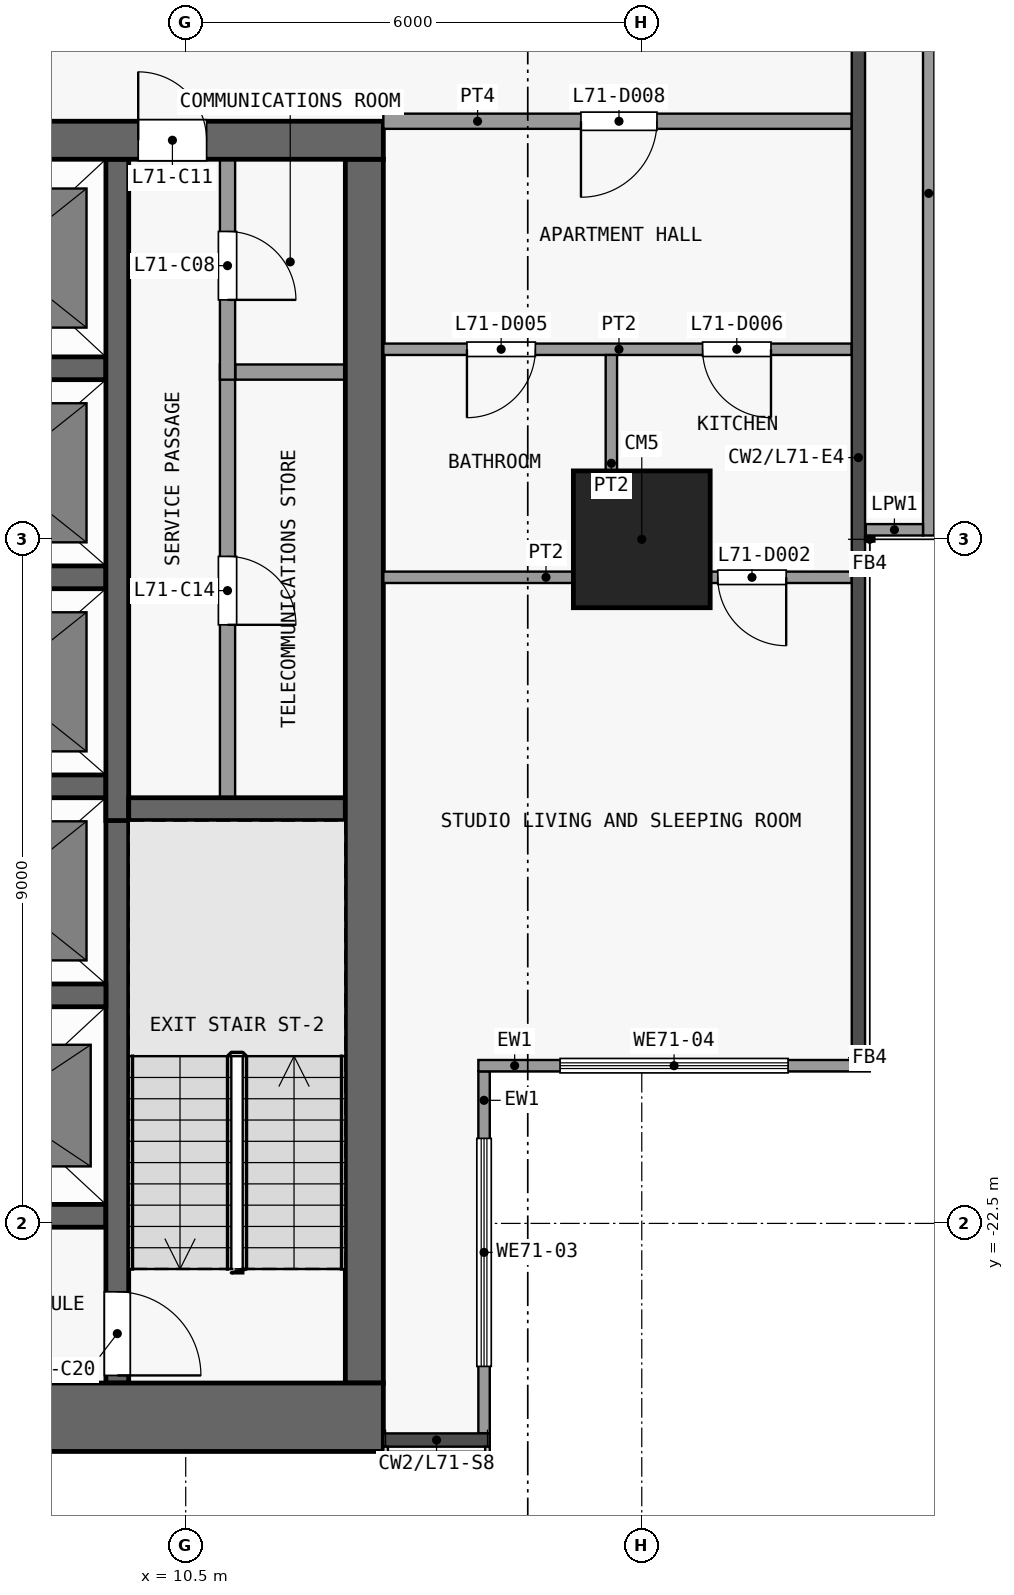
"""IFC4 building model, lengths in metres.
Left out: names, types, materials, properties, quantities, classifications, styles, units other than length and angle.
Written with IfcOpenShell. Run it as: python <this file> out.ifc"""

import sys

from ifc_helpers import new_model, si_unit, direction, frame, frame_2d, origin, origin_2d, place, context, subcontext, project, spatial, rectangle, extrude, element, fill, save


model = new_model("IFC4")
c1 = context("Model", 3, precision=1e-05, world=origin(), true_north=direction((0.0, 1.0)))
c2 = subcontext(c1, "Body", "Model", "MODEL_VIEW")
j1 = project(units=[si_unit("LENGTHUNIT", "METRE"), si_unit("PLANEANGLEUNIT", "RADIAN")], contexts=[c1])
p1 = place(None, origin())
s1 = spatial("IfcSite", under=j1, at=p1, CompositionType="ELEMENT")
p2 = place(p1, origin())
s2 = spatial("IfcBuilding", under=s1, at=p2, CompositionType="ELEMENT")
p3 = place(p2, frame((0.0, 0.0, 280.7)))
s3 = spatial("IfcBuildingStorey", under=s2, at=p3, CompositionType="ELEMENT", Elevation=280.7)
p4 = place(p3, frame((16.5, -13.5, 0.0), z_axis=(0.0, 0.0, 1.0), x_axis=(1.0, 0.0, 0.0)))
e1 = element("IfcColumn", 1, at=p4, inside=s3, PredefinedType="COLUMN", context=c2, shape_type="SweptSolid", body=[
    extrude(rectangle(XDim=1.8, YDim=1.8, at=origin_2d()), origin(), (0.0, 0.0, 1.0), 3.6),
])
p5 = place(p3, frame((-13.1, -25.05, 0.0), z_axis=(0.0, 0.0, 1.0), x_axis=(1.0, 0.0, 0.0)))
e2 = element("IfcWall", 2, at=p5, inside=s3, PredefinedType="SHEAR", context=c2, shape_type="SweptSolid", body=[
    extrude(rectangle(XDim=26.2, YDim=0.9, at=frame_2d((13.1, 0.0))), origin(), (0.0, 0.0, 1.0), 3.3),
])
p6 = place(p3, frame((-13.1, -8.25, 0.0), z_axis=(0.0, 0.0, 1.0), x_axis=(1.0, 0.0, 0.0)))
e3 = element("IfcWall", 3, at=p6, inside=s3, PredefinedType="SHEAR", context=c2, shape_type="SweptSolid", body=[
    extrude(rectangle(XDim=26.2, YDim=0.5, at=frame_2d((13.1, 0.0))), origin(), (0.0, 0.0, 1.0), 3.3),
])
p7 = place(p6, frame((7.4, 0.0, 0.0)))
e4 = element("IfcOpeningElement", 4, at=p7, cuts=e3, PredefinedType="OPENING", context=c2, shape_type="SweptSolid", body=[
    extrude(rectangle(XDim=1.8, YDim=2.1, at=frame_2d((0.9, 1.05))), frame((0.0, 0.26, 0.0), z_axis=(0.0, -1.0, 0.0), x_axis=(1.0, 0.0, 0.0)), (0.0, 0.0, 1.0), 0.52),
])
p8 = place(p6, frame((17.0, 0.0, 0.0)))
e5 = element("IfcOpeningElement", 5, at=p8, cuts=e3, PredefinedType="OPENING", context=c2, shape_type="SweptSolid", body=[
    extrude(rectangle(XDim=1.8, YDim=2.1, at=frame_2d((0.9, 1.05))), frame((0.0, 0.26, 0.0), z_axis=(0.0, -1.0, 0.0), x_axis=(1.0, 0.0, 0.0)), (0.0, 0.0, 1.0), 0.52),
])
p9 = place(p6, frame((2.325, 0.0, 0.0)))
e6 = element("IfcOpeningElement", 6, at=p9, cuts=e3, PredefinedType="OPENING", context=c2, shape_type="SweptSolid", body=[
    extrude(rectangle(XDim=0.9, YDim=2.1, at=frame_2d((0.45, 1.05))), frame((0.0, 0.26, 0.0), z_axis=(0.0, -1.0, 0.0), x_axis=(1.0, 0.0, 0.0)), (0.0, 0.0, 1.0), 0.52),
])
p10 = place(p6, frame((22.975, 0.0, 0.0)))
e7 = element("IfcOpeningElement", 7, at=p10, cuts=e3, PredefinedType="OPENING", context=c2, shape_type="SweptSolid", body=[
    extrude(rectangle(XDim=0.9, YDim=2.1, at=frame_2d((0.45, 1.05))), frame((0.0, 0.26, 0.0), z_axis=(0.0, -1.0, 0.0), x_axis=(1.0, 0.0, 0.0)), (0.0, 0.0, 1.0), 0.52),
])
p11 = place(p3, frame((12.85, -24.6, 0.0), z_axis=(0.0, 0.0, 1.0), x_axis=(0.0, 1.0, 0.0)))
e8 = element("IfcWall", 8, at=p11, inside=s3, PredefinedType="SHEAR", context=c2, shape_type="SweptSolid", body=[
    extrude(rectangle(XDim=16.1, YDim=0.5, at=frame_2d((8.05, 0.0))), origin(), (0.0, 0.0, 1.0), 3.3),
])
for number, where, z_axis, x_axis in (
    (9, (6.65, -22.4, 0.0), (0.0, 0.0, 1.0), (1.0, 0.0, 0.0)),
    (10, (6.65, -19.5, 0.0), (0.0, 0.0, 1.0), (1.0, 0.0, 0.0)),
):
    element("IfcWall", number, at=place(p3, frame(where, z_axis=z_axis, x_axis=x_axis)), inside=s3, PredefinedType="SHEAR", context=c2, shape_type="SweptSolid", body=[
        extrude(rectangle(XDim=2.8, YDim=0.3, at=frame_2d((1.4, 0.0))), origin(), (0.0, 0.0, 1.0), 3.3),
    ])
p12 = place(p3, frame((9.75, -17.05, 0.0), z_axis=(0.0, 0.0, 1.0), x_axis=(1.0, 0.0, 0.0)))
e11 = element("IfcWall", 11, at=p12, inside=s3, PredefinedType="SHEAR", context=c2, shape_type="SweptSolid", body=[
    extrude(rectangle(XDim=2.85, YDim=0.3, at=frame_2d((1.425, 0.0))), origin(), (0.0, 0.0, 1.0), 3.3),
])
for number, where, z_axis, x_axis in (
    (12, (6.65, -16.75, 0.0), (0.0, 0.0, 1.0), (1.0, 0.0, 0.0)),
    (13, (6.65, -14.0, 0.0), (0.0, 0.0, 1.0), (1.0, 0.0, 0.0)),
):
    element("IfcWall", number, at=place(p3, frame(where, z_axis=z_axis, x_axis=x_axis)), inside=s3, PredefinedType="SHEAR", context=c2, shape_type="SweptSolid", body=[
        extrude(rectangle(XDim=2.8, YDim=0.3, at=frame_2d((1.4, 0.0))), origin(), (0.0, 0.0, 1.0), 3.3),
    ])
p13 = place(p3, frame((11.15, -11.3, 0.0), z_axis=(0.0, 0.0, 1.0), x_axis=(1.0, 0.0, 0.0)))
e14 = element("IfcWall", 14, at=p13, inside=s3, PredefinedType="PARTITIONING", context=c2, shape_type="SweptSolid", body=[
    extrude(rectangle(XDim=1.45, YDim=0.2, at=frame_2d((0.725, 0.0))), origin(), (0.0, 0.0, 1.0), 3.3),
])
p14 = place(p3, frame((6.65, -11.25, 0.0), z_axis=(0.0, 0.0, 1.0), x_axis=(1.0, 0.0, 0.0)))
e15 = element("IfcWall", 15, at=p14, inside=s3, PredefinedType="SHEAR", context=c2, shape_type="SweptSolid", body=[
    extrude(rectangle(XDim=2.8, YDim=0.3, at=frame_2d((1.4, 0.0))), origin(), (0.0, 0.0, 1.0), 3.3),
])
p15 = place(p3, frame((9.6, -16.9, 0.0), z_axis=(0.0, 0.0, 1.0), x_axis=(0.0, -1.0, 0.0)))
e16 = element("IfcWall", 16, at=p15, inside=s3, PredefinedType="SHEAR", context=c2, shape_type="SweptSolid", body=[
    extrude(rectangle(XDim=7.7, YDim=0.3, at=frame_2d((3.85, 0.0))), origin(), (0.0, 0.0, 1.0), 3.3),
])
p16 = place(p15, frame((6.5, 0.0, 0.0)))
e17 = element("IfcOpeningElement", 17, at=p16, cuts=e16, PredefinedType="OPENING", context=c2, shape_type="SweptSolid", body=[
    extrude(rectangle(XDim=1.1, YDim=2.1, at=frame_2d((0.55, 1.05))), frame((0.0, 0.16, 0.0), z_axis=(0.0, -1.0, 0.0), x_axis=(1.0, 0.0, 0.0)), (0.0, 0.0, 1.0), 0.32),
])
p17 = place(p3, frame((9.6, -17.2, 0.0), z_axis=(0.0, 0.0, 1.0), x_axis=(0.0, 1.0, 0.0)))
e18 = element("IfcWall", 18, at=p17, inside=s3, PredefinedType="SHEAR", context=c2, shape_type="SweptSolid", body=[
    extrude(rectangle(XDim=8.7, YDim=0.3, at=frame_2d((4.35, 0.0))), origin(), (0.0, 0.0, 1.0), 3.3),
])
p18 = place(p3, frame((11.05, -11.2, 0.0), z_axis=(0.0, 0.0, 1.0), x_axis=(0.0, -1.0, 0.0)))
e19 = element("IfcWall", 19, at=p18, inside=s3, PredefinedType="PARTITIONING", context=c2, shape_type="SweptSolid", body=[
    extrude(rectangle(XDim=5.7, YDim=0.2, at=frame_2d((2.85, 0.0))), origin(), (0.0, 0.0, 1.0), 3.3),
])
p19 = place(p18, frame((2.525, 0.0, 0.0)))
e20 = element("IfcOpeningElement", 20, at=p19, cuts=e19, PredefinedType="OPENING", context=c2, shape_type="SweptSolid", body=[
    extrude(rectangle(XDim=0.9, YDim=2.1, at=frame_2d((0.45, 1.05))), frame((0.0, 0.11, 0.0), z_axis=(0.0, -1.0, 0.0), x_axis=(1.0, 0.0, 0.0)), (0.0, 0.0, 1.0), 0.22),
])
p20 = place(p3, frame((11.05, -8.5, 0.0), z_axis=(0.0, 0.0, 1.0), x_axis=(0.0, -1.0, 0.0)))
e21 = element("IfcWall", 21, at=p20, inside=s3, PredefinedType="PARTITIONING", context=c2, shape_type="SweptSolid", body=[
    extrude(rectangle(XDim=2.9, YDim=0.2, at=frame_2d((1.45, 0.0))), origin(), (0.0, 0.0, 1.0), 3.3),
])
p21 = place(p20, frame((0.95, 0.0, 0.0)))
e22 = element("IfcOpeningElement", 22, at=p21, cuts=e21, PredefinedType="OPENING", context=c2, shape_type="SweptSolid", body=[
    extrude(rectangle(XDim=0.9, YDim=2.1, at=frame_2d((0.45, 1.05))), frame((0.0, 0.11, 0.0), z_axis=(0.0, -1.0, 0.0), x_axis=(1.0, 0.0, 0.0)), (0.0, 0.0, 1.0), 0.22),
])
p22 = place(p3, frame((14.425, -20.5, 0.0), z_axis=(0.0, 0.0, 1.0), x_axis=(0.0, -1.0, 0.0)))
e23 = element("IfcWall", 23, at=p22, inside=s3, PredefinedType="SOLIDWALL", context=c2, shape_type="SweptSolid", body=[
    extrude(rectangle(XDim=4.762, YDim=0.15, at=frame_2d((2.381, 0.0))), origin(), (0.0, 0.0, 1.0), 3.3),
])
p23 = place(p22, frame((0.881, 0.0, 0.9)))
e24 = element("IfcOpeningElement", 24, at=p23, cuts=e23, PredefinedType="OPENING", context=c2, shape_type="SweptSolid", body=[
    extrude(rectangle(XDim=3.0, YDim=2.4, at=frame_2d((1.5, 1.2))), frame((0.0, 0.085, 0.0), z_axis=(0.0, -1.0, 0.0), x_axis=(1.0, 0.0, 0.0)), (0.0, 0.0, 1.0), 0.17),
])
p24 = place(p3, frame((19.5, -20.425, 0.0), z_axis=(0.0, 0.0, 1.0), x_axis=(-1.0, 0.0, 0.0)))
e25 = element("IfcWall", 25, at=p24, inside=s3, PredefinedType="SOLIDWALL", context=c2, shape_type="SweptSolid", body=[
    extrude(rectangle(XDim=5.15, YDim=0.15, at=frame_2d((2.575, 0.0))), origin(), (0.0, 0.0, 1.0), 3.3),
])
p25 = place(p24, frame((1.075, 0.0, 0.9)))
e26 = element("IfcOpeningElement", 26, at=p25, cuts=e25, PredefinedType="OPENING", context=c2, shape_type="SweptSolid", body=[
    extrude(rectangle(XDim=3.0, YDim=2.4, at=frame_2d((1.5, 1.2))), frame((0.0, 0.085, 0.0), z_axis=(0.0, -1.0, 0.0), x_axis=(1.0, 0.0, 0.0)), (0.0, 0.0, 1.0), 0.17),
])
p26 = place(p3, frame((20.275, -4.448, 0.0), z_axis=(0.0, 0.0, 1.0), x_axis=(0.0, -1.0, 0.0)))
e27 = element("IfcWall", 27, at=p26, inside=s3, PredefinedType="PARAPET", context=c2, shape_type="SweptSolid", body=[
    extrude(rectangle(XDim=9.002, YDim=0.15, at=frame_2d((4.501, 0.0))), origin(), (0.0, 0.0, 1.0), 1.15),
])
p27 = place(p3, frame((20.2, -13.375, 0.0), z_axis=(0.0, 0.0, 1.0), x_axis=(-1.0, 0.0, 0.0)))
e28 = element("IfcWall", 28, at=p27, inside=s3, PredefinedType="PARAPET", context=c2, shape_type="SweptSolid", body=[
    extrude(rectangle(XDim=0.752, YDim=0.15, at=frame_2d((0.376, 0.0))), origin(), (0.0, 0.0, 1.0), 1.15),
])
p28 = place(p3, frame((13.1, -14.0, 0.0), z_axis=(0.0, 0.0, 1.0), x_axis=(1.0, 0.0, 0.0)))
e29 = element("IfcWall", 29, at=p28, inside=s3, PredefinedType="PARTITIONING", context=c2, shape_type="SweptSolid", body=[
    extrude(rectangle(XDim=6.162, YDim=0.15, at=frame_2d((3.081, 0.0))), origin(), (0.0, 0.0, 1.0), 3.3),
])
p29 = place(p28, frame((4.4, 0.0, 0.0)))
e30 = element("IfcOpeningElement", 30, at=p29, cuts=e29, PredefinedType="OPENING", context=c2, shape_type="SweptSolid", body=[
    extrude(rectangle(XDim=0.9, YDim=2.1, at=frame_2d((0.45, 1.05))), frame((0.0, 0.085, 0.0), z_axis=(0.0, -1.0, 0.0), x_axis=(1.0, 0.0, 0.0)), (0.0, 0.0, 1.0), 0.17),
])
p30 = place(p3, frame((13.1, -11.0, 0.0), z_axis=(0.0, 0.0, 1.0), x_axis=(1.0, 0.0, 0.0)))
e31 = element("IfcWall", 31, at=p30, inside=s3, PredefinedType="PARTITIONING", context=c2, shape_type="SweptSolid", body=[
    extrude(rectangle(XDim=6.162, YDim=0.15, at=frame_2d((3.081, 0.0))), origin(), (0.0, 0.0, 1.0), 3.3),
])
p31 = place(p30, frame((1.1, 0.0, 0.0)))
e32 = element("IfcOpeningElement", 32, at=p31, cuts=e31, PredefinedType="OPENING", context=c2, shape_type="SweptSolid", body=[
    extrude(rectangle(XDim=0.9, YDim=2.1, at=frame_2d((0.45, 1.05))), frame((0.0, 0.085, 0.0), z_axis=(0.0, -1.0, 0.0), x_axis=(1.0, 0.0, 0.0)), (0.0, 0.0, 1.0), 0.17),
])
p32 = place(p30, frame((4.2, 0.0, 0.0)))
e33 = element("IfcOpeningElement", 33, at=p32, cuts=e31, PredefinedType="OPENING", context=c2, shape_type="SweptSolid", body=[
    extrude(rectangle(XDim=0.9, YDim=2.1, at=frame_2d((0.45, 1.05))), frame((0.0, 0.085, 0.0), z_axis=(0.0, -1.0, 0.0), x_axis=(1.0, 0.0, 0.0)), (0.0, 0.0, 1.0), 0.17),
])
p33 = place(p3, frame((13.1, -8.0, 0.0), z_axis=(0.0, 0.0, 1.0), x_axis=(1.0, 0.0, 0.0)))
e34 = element("IfcWall", 34, at=p33, inside=s3, PredefinedType="PARTITIONING", context=c2, shape_type="SweptSolid", body=[
    extrude(rectangle(XDim=6.162, YDim=0.2, at=frame_2d((3.081, 0.0))), origin(), (0.0, 0.0, 1.0), 3.3),
])
p34 = place(p33, frame((2.6, 0.0, 0.0)))
e35 = element("IfcOpeningElement", 35, at=p34, cuts=e34, PredefinedType="OPENING", context=c2, shape_type="SweptSolid", body=[
    extrude(rectangle(XDim=1.0, YDim=2.1, at=frame_2d((0.5, 1.05))), frame((0.0, 0.11, 0.0), z_axis=(0.0, -1.0, 0.0), x_axis=(1.0, 0.0, 0.0)), (0.0, 0.0, 1.0), 0.22),
])
p35 = place(p3, frame((16.1, -13.925, 0.0), z_axis=(0.0, 0.0, 1.0), x_axis=(0.0, 1.0, 0.0)))
e36 = element("IfcWall", 36, at=p35, inside=s3, PredefinedType="PARTITIONING", context=c2, shape_type="SweptSolid", body=[
    extrude(rectangle(XDim=2.85, YDim=0.15, at=frame_2d((1.425, 0.0))), origin(), (0.0, 0.0, 1.0), 3.3),
])
p36 = place(p21, origin())
e37 = element("IfcDoor", 37, at=p36, inside=s3, OperationType="SINGLE_SWING_RIGHT", PredefinedType="DOOR", context=c2, shape_type="SweptSolid", body=[
    extrude(rectangle(XDim=0.9, YDim=2.1, at=frame_2d((0.45, 1.05))), frame((0.0, 0.025, 0.0), z_axis=(0.0, -1.0, 0.0), x_axis=(1.0, 0.0, 0.0)), (0.0, 0.0, 1.0), 0.05),
])
fill(e22, e37)
p37 = place(p10, origin())
e38 = element("IfcDoor", 38, at=p37, inside=s3, OperationType="SINGLE_SWING_LEFT", PredefinedType="DOOR", context=c2, shape_type="SweptSolid", body=[
    extrude(rectangle(XDim=0.9, YDim=2.1, at=frame_2d((0.45, 1.05))), frame((0.0, 0.025, 0.0), z_axis=(0.0, -1.0, 0.0), x_axis=(1.0, 0.0, 0.0)), (0.0, 0.0, 1.0), 0.05),
])
fill(e7, e38)
p38 = place(p19, origin())
e39 = element("IfcDoor", 39, at=p38, inside=s3, OperationType="SINGLE_SWING_RIGHT", PredefinedType="DOOR", context=c2, shape_type="SweptSolid", body=[
    extrude(rectangle(XDim=0.9, YDim=2.1, at=frame_2d((0.45, 1.05))), frame((0.0, 0.025, 0.0), z_axis=(0.0, -1.0, 0.0), x_axis=(1.0, 0.0, 0.0)), (0.0, 0.0, 1.0), 0.05),
])
fill(e20, e39)
p39 = place(p16, origin())
e40 = element("IfcDoor", 40, at=p39, inside=s3, OperationType="SINGLE_SWING_RIGHT", PredefinedType="DOOR", context=c2, shape_type="SweptSolid", body=[
    extrude(rectangle(XDim=1.1, YDim=2.1, at=frame_2d((0.55, 1.05))), frame((0.0, 0.025, 0.0), z_axis=(0.0, -1.0, 0.0), x_axis=(1.0, 0.0, 0.0)), (0.0, 0.0, 1.0), 0.05),
])
fill(e17, e40)
p40 = place(p23, origin())
e41 = element("IfcWindow", 41, at=p40, inside=s3, PartitioningType="SINGLE_PANEL", PredefinedType="WINDOW", context=c2, shape_type="SweptSolid", body=[
    extrude(rectangle(XDim=3.0, YDim=2.4, at=frame_2d((1.5, 1.2))), frame((0.0, 0.03, 0.0), z_axis=(0.0, -1.0, 0.0), x_axis=(1.0, 0.0, 0.0)), (0.0, 0.0, 1.0), 0.06),
])
fill(e24, e41)
p41 = place(p25, origin())
e42 = element("IfcWindow", 42, at=p41, inside=s3, PartitioningType="SINGLE_PANEL", PredefinedType="WINDOW", context=c2, shape_type="SweptSolid", body=[
    extrude(rectangle(XDim=3.0, YDim=2.4, at=frame_2d((1.5, 1.2))), frame((0.0, 0.03, 0.0), z_axis=(0.0, -1.0, 0.0), x_axis=(1.0, 0.0, 0.0)), (0.0, 0.0, 1.0), 0.06),
])
fill(e26, e42)
p42 = place(p29, origin())
e43 = element("IfcDoor", 43, at=p42, inside=s3, OperationType="SINGLE_SWING_RIGHT", PredefinedType="DOOR", context=c2, shape_type="SweptSolid", body=[
    extrude(rectangle(XDim=0.9, YDim=2.1, at=frame_2d((0.45, 1.05))), frame((0.0, 0.025, 0.0), z_axis=(0.0, -1.0, 0.0), x_axis=(1.0, 0.0, 0.0)), (0.0, 0.0, 1.0), 0.05),
])
fill(e30, e43)
p43 = place(p31, origin())
e44 = element("IfcDoor", 44, at=p43, inside=s3, OperationType="SINGLE_SWING_LEFT", PredefinedType="DOOR", context=c2, shape_type="SweptSolid", body=[
    extrude(rectangle(XDim=0.9, YDim=2.1, at=frame_2d((0.45, 1.05))), frame((0.0, 0.025, 0.0), z_axis=(0.0, -1.0, 0.0), x_axis=(1.0, 0.0, 0.0)), (0.0, 0.0, 1.0), 0.05),
])
fill(e32, e44)
p44 = place(p32, origin())
e45 = element("IfcDoor", 45, at=p44, inside=s3, OperationType="SINGLE_SWING_RIGHT", PredefinedType="DOOR", context=c2, shape_type="SweptSolid", body=[
    extrude(rectangle(XDim=0.9, YDim=2.1, at=frame_2d((0.45, 1.05))), frame((0.0, 0.025, 0.0), z_axis=(0.0, -1.0, 0.0), x_axis=(1.0, 0.0, 0.0)), (0.0, 0.0, 1.0), 0.05),
])
fill(e33, e45)
p45 = place(p34, origin())
e46 = element("IfcDoor", 46, at=p45, inside=s3, OperationType="SINGLE_SWING_LEFT", PredefinedType="DOOR", context=c2, shape_type="SweptSolid", body=[
    extrude(rectangle(XDim=1.0, YDim=2.1, at=frame_2d((0.5, 1.05))), frame((0.0, 0.025, 0.0), z_axis=(0.0, -1.0, 0.0), x_axis=(1.0, 0.0, 0.0)), (0.0, 0.0, 1.0), 0.05),
])
fill(e35, e46)
save(model, sys.argv[1])
